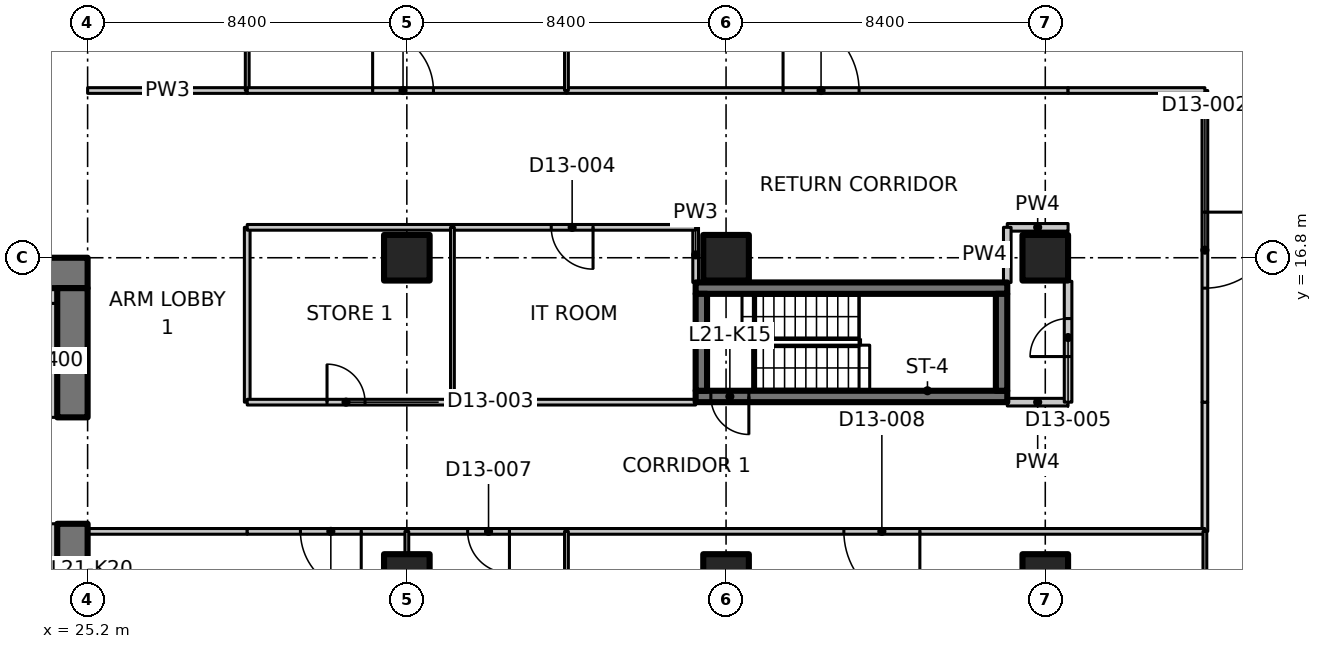
"""IFC4 building model, lengths in metres.
Left out: names, types, materials, properties, quantities, classifications, styles, units other than length and angle.
Written with IfcOpenShell. Run it as: python <this file> out.ifc"""

import sys

from ifc_helpers import new_model, si_unit, direction, frame, frame_2d, origin, origin_2d, place, context, subcontext, project, spatial, polyline, rectangle, outline, extrude, element, fill, save


model = new_model("IFC4")
c1 = context("Model", 3, precision=1e-05, world=origin(), true_north=direction((0.0, 1.0)))
c2 = subcontext(c1, "Body", "Model", "MODEL_VIEW")
j1 = project(units=[si_unit("LENGTHUNIT", "METRE"), si_unit("PLANEANGLEUNIT", "RADIAN")], contexts=[c1])
p1 = place(None, origin())
s1 = spatial("IfcSite", under=j1, at=p1, CompositionType="ELEMENT")
p2 = place(p1, origin())
s2 = spatial("IfcBuilding", under=s1, at=p2, CompositionType="ELEMENT")
p3 = place(p2, frame((0.0, 0.0, 91.7)))
s3 = spatial("IfcBuildingStorey", under=s2, at=p3, CompositionType="ELEMENT", Elevation=91.7)
for number, where, z_axis, x_axis in (
    (1, (33.6, 8.4, 0.0), (0.0, 0.0, 1.0), (1.0, 0.0, 0.0)),
    (2, (33.6, 16.8, 0.0), (0.0, 0.0, 1.0), (1.0, 0.0, 0.0)),
    (3, (42.0, 8.4, 0.0), (0.0, 0.0, 1.0), (1.0, 0.0, 0.0)),
    (4, (42.0, 16.8, 0.0), (0.0, 0.0, 1.0), (1.0, 0.0, 0.0)),
    (5, (50.4, 8.4, 0.0), (0.0, 0.0, 1.0), (1.0, 0.0, 0.0)),
    (6, (50.4, 16.8, 0.0), (0.0, 0.0, 1.0), (1.0, 0.0, 0.0)),
):
    element("IfcColumn", number, at=place(p3, frame(where, z_axis=z_axis, x_axis=x_axis)), inside=s3, PredefinedType="COLUMN", context=c2, shape_type="SweptSolid", body=[
        extrude(rectangle(XDim=1.2, YDim=1.2, at=origin_2d()), origin(), (0.0, 0.0, 1.0), 3.35),
    ])
p4 = place(p3, frame((23.8, 16.4, 0.0), z_axis=(0.0, 0.0, 1.0), x_axis=(1.0, 0.0, 0.0)))
e7 = element("IfcWall", 7, at=p4, inside=s3, PredefinedType="SHEAR", context=c2, shape_type="SweptSolid", body=[
    extrude(rectangle(XDim=1.4, YDim=0.8, at=frame_2d((0.7, 0.0))), origin(), (0.0, 0.0, 1.0), 3.35),
])
p5 = place(p3, frame((24.8, 0.8, 0.0), z_axis=(0.0, 0.0, 1.0), x_axis=(0.0, 1.0, 0.0)))
e8 = element("IfcWall", 8, at=p5, inside=s3, PredefinedType="SHEAR", context=c2, shape_type="SweptSolid", body=[
    extrude(rectangle(XDim=9.0, YDim=0.8, at=frame_2d((4.5, 0.0))), origin(), (0.0, 0.0, 1.0), 3.35),
])
p6 = place(p3, frame((24.8, 12.6, 0.0), z_axis=(0.0, 0.0, 1.0), x_axis=(0.0, 1.0, 0.0)))
e9 = element("IfcWall", 9, at=p6, inside=s3, PredefinedType="SHEAR", context=c2, shape_type="SweptSolid", body=[
    extrude(rectangle(XDim=3.4, YDim=0.8, at=frame_2d((1.7, 0.0))), origin(), (0.0, 0.0, 1.0), 3.35),
])
p7 = place(p3, frame((24.2, 12.6, 0.0), z_axis=(0.0, 0.0, 1.0), x_axis=(0.0, 1.0, 0.0)))
e10 = element("IfcWall", 10, at=p7, inside=s3, PredefinedType="PARTITIONING", context=c2, shape_type="SweptSolid", body=[
    extrude(rectangle(XDim=3.0, YDim=0.4, at=frame_2d((1.5, 0.0))), origin(), (0.0, 0.0, 1.0), 3.35),
])
p8 = place(p3, frame((23.8, 15.8, 0.0), z_axis=(0.0, 0.0, 1.0), x_axis=(1.0, 0.0, 0.0)))
e11 = element("IfcWall", 11, at=p8, inside=s3, PredefinedType="PARTITIONING", context=c2, shape_type="SweptSolid", body=[
    extrude(rectangle(XDim=0.6, YDim=0.4, at=frame_2d((0.3, 0.0))), origin(), (0.0, 0.0, 1.0), 3.35),
])
p9 = place(p3, frame((49.4, 13.15, 0.0), z_axis=(0.0, 0.0, 1.0), x_axis=(-1.0, 0.0, 0.0)))
e12 = element("IfcWall", 12, at=p9, inside=s3, PredefinedType="SHEAR", context=c2, shape_type="SweptSolid", body=[
    extrude(rectangle(XDim=8.2, YDim=0.3, at=frame_2d((4.1, 0.0))), origin(), (0.0, 0.0, 1.0), 3.35),
])
p10 = place(p9, frame((6.8, 0.0, 0.0)))
e13 = element("IfcOpeningElement", 13, at=p10, cuts=e12, PredefinedType="OPENING", context=c2, shape_type="SweptSolid", body=[
    extrude(rectangle(XDim=1.0, YDim=2.1, at=frame_2d((0.5, 1.05))), frame((0.0, 0.16, 0.0), z_axis=(0.0, -1.0, 0.0), x_axis=(1.0, 0.0, 0.0)), (0.0, 0.0, 1.0), 0.32),
])
p11 = place(p3, frame((41.2, 16.0, 0.0), z_axis=(0.0, 0.0, 1.0), x_axis=(1.0, 0.0, 0.0)))
e14 = element("IfcWall", 14, at=p11, inside=s3, PredefinedType="SHEAR", context=c2, shape_type="SweptSolid", body=[
    extrude(rectangle(XDim=8.2, YDim=0.3, at=frame_2d((4.1, 0.0))), origin(), (0.0, 0.0, 1.0), 3.35),
])
for number, where, z_axis, x_axis in (
    (15, (41.35, 13.3, 0.0), (0.0, 0.0, 1.0), (0.0, 1.0, 0.0)),
    (16, (49.25, 13.3, 0.0), (0.0, 0.0, 1.0), (0.0, 1.0, 0.0)),
):
    element("IfcWall", number, at=place(p3, frame(where, z_axis=z_axis, x_axis=x_axis)), inside=s3, PredefinedType="SHEAR", context=c2, shape_type="SweptSolid", body=[
        extrude(rectangle(XDim=2.55, YDim=0.3, at=frame_2d((1.275, 0.0))), origin(), (0.0, 0.0, 1.0), 3.35),
    ])
p12 = place(p3, frame((24.2, 4.35, 0.0), z_axis=(0.0, 0.0, 1.0), x_axis=(0.0, 1.0, 0.0)))
e17 = element("IfcWall", 17, at=p12, inside=s3, PredefinedType="PARTITIONING", context=c2, shape_type="SweptSolid", body=[
    extrude(rectangle(XDim=5.45, YDim=0.4, at=frame_2d((2.725, 0.0))), origin(), (0.0, 0.0, 1.0), 3.35),
])
p13 = place(p3, frame((25.2, 21.2, 0.0), z_axis=(0.0, 0.0, 1.0), x_axis=(1.0, 0.0, 0.0)))
e18 = element("IfcWall", 18, at=p13, inside=s3, PredefinedType="PARTITIONING", context=c2, shape_type="SweptSolid", body=[
    extrude(rectangle(XDim=4.2, YDim=0.15, at=frame_2d((2.1, 0.0))), origin(), (0.0, 0.0, 1.0), 3.33),
])
p14 = place(p3, frame((29.4, 17.6, 0.0), z_axis=(0.0, 0.0, 1.0), x_axis=(0.0, -1.0, 0.0)))
e19 = element("IfcWall", 19, at=p14, inside=s3, PredefinedType="PARTITIONING", context=c2, shape_type="SweptSolid", body=[
    extrude(rectangle(XDim=4.6, YDim=0.15, at=frame_2d((2.3, 0.0))), origin(), (0.0, 0.0, 1.0), 3.33),
])
p15 = place(p3, frame((29.4, 9.6, 0.0), z_axis=(0.0, 0.0, 1.0), x_axis=(-1.0, 0.0, 0.0)))
e20 = element("IfcWall", 20, at=p15, inside=s3, PredefinedType="PARTITIONING", context=c2, shape_type="SweptSolid", body=[
    extrude(rectangle(XDim=4.2, YDim=0.15, at=frame_2d((2.1, 0.0))), origin(), (0.0, 0.0, 1.0), 3.33),
])
p16 = place(p3, frame((29.4, 27.511, 0.0), z_axis=(0.0, 0.0, 1.0), x_axis=(0.0, -1.0, 0.0)))
e21 = element("IfcWall", 21, at=p16, inside=s3, PredefinedType="PARTITIONING", context=c2, shape_type="SweptSolid", body=[
    extrude(outline(polyline([(0.0, 0.0), (6.311, 0.0), (6.311, 3.33), (2.761, 3.33), (2.759, 2.98), (1.863, 2.98), (1.861, 3.33), (0.236, 3.33), (0.0, 3.33), (0.0, 0.0)])), frame((0.0, 0.05, 0.0), z_axis=(0.0, -1.0, 0.0), x_axis=(1.0, 0.0, 0.0)), (0.0, 0.0, 1.0), 0.1),
])
p17 = place(p3, frame((54.6, 13.0, 0.0), z_axis=(0.0, 0.0, 1.0), x_axis=(0.0, -1.0, 0.0)))
e22 = element("IfcWall", 22, at=p17, inside=s3, PredefinedType="PARTITIONING", context=c2, shape_type="SweptSolid", body=[
    extrude(rectangle(XDim=3.4, YDim=0.15, at=frame_2d((1.7, 0.0))), origin(), (0.0, 0.0, 1.0), 3.33),
])
p18 = place(p3, frame((29.4, 13.0, 0.0), z_axis=(0.0, 0.0, 1.0), x_axis=(1.0, 0.0, 0.0)))
e23 = element("IfcWall", 23, at=p18, inside=s3, PredefinedType="PARTITIONING", context=c2, shape_type="SweptSolid", body=[
    extrude(rectangle(XDim=5.4, YDim=0.15, at=frame_2d((2.7, 0.0))), origin(), (0.0, 0.0, 1.0), 3.33),
])
p19 = place(p18, frame((2.1, 0.0, 0.0)))
e24 = element("IfcOpeningElement", 24, at=p19, cuts=e23, PredefinedType="OPENING", context=c2, shape_type="SweptSolid", body=[
    extrude(rectangle(XDim=1.0, YDim=2.1, at=frame_2d((0.5, 1.05))), frame((0.0, 0.085, 0.0), z_axis=(0.0, -1.0, 0.0), x_axis=(1.0, 0.0, 0.0)), (0.0, 0.0, 1.0), 0.17),
])
p20 = place(p3, frame((34.8, 13.0, 0.0), z_axis=(0.0, 0.0, 1.0), x_axis=(1.0, 0.0, 0.0)))
e25 = element("IfcWall", 25, at=p20, inside=s3, PredefinedType="PARTITIONING", context=c2, shape_type="SweptSolid", body=[
    extrude(rectangle(XDim=6.4, YDim=0.15, at=frame_2d((3.2, 0.0))), origin(), (0.0, 0.0, 1.0), 3.33),
])
p21 = place(p3, frame((49.4, 13.0, 0.0), z_axis=(0.0, 0.0, 1.0), x_axis=(1.0, 0.0, 0.0)))
e26 = element("IfcWall", 26, at=p21, inside=s3, PredefinedType="PARTITIONING", context=c2, shape_type="SweptSolid", body=[
    extrude(rectangle(XDim=1.6, YDim=0.2, at=frame_2d((0.8, 0.0))), origin(), (0.0, 0.0, 1.0), 3.33),
])
p22 = place(p3, frame((33.6, 9.6, 0.0), z_axis=(0.0, 0.0, 1.0), x_axis=(-1.0, 0.0, 0.0)))
e27 = element("IfcWall", 27, at=p22, inside=s3, PredefinedType="PARTITIONING", context=c2, shape_type="SweptSolid", body=[
    extrude(rectangle(XDim=4.2, YDim=0.15, at=frame_2d((2.1, 0.0))), origin(), (0.0, 0.0, 1.0), 3.33),
])
p23 = place(p22, frame((1.2, 0.0, 0.0)))
e28 = element("IfcOpeningElement", 28, at=p23, cuts=e27, PredefinedType="OPENING", context=c2, shape_type="SweptSolid", body=[
    extrude(rectangle(XDim=1.6, YDim=2.1, at=frame_2d((0.8, 1.05))), frame((0.0, 0.085, 0.0), z_axis=(0.0, -1.0, 0.0), x_axis=(1.0, 0.0, 0.0)), (0.0, 0.0, 1.0), 0.17),
])
p24 = place(p3, frame((37.8, 9.6, 0.0), z_axis=(0.0, 0.0, 1.0), x_axis=(-1.0, 0.0, 0.0)))
e29 = element("IfcWall", 29, at=p24, inside=s3, PredefinedType="PARTITIONING", context=c2, shape_type="SweptSolid", body=[
    extrude(rectangle(XDim=4.2, YDim=0.15, at=frame_2d((2.1, 0.0))), origin(), (0.0, 0.0, 1.0), 3.33),
])
p25 = place(p24, frame((1.5, 0.0, 0.0)))
e30 = element("IfcOpeningElement", 30, at=p25, cuts=e29, PredefinedType="OPENING", context=c2, shape_type="SweptSolid", body=[
    extrude(rectangle(XDim=1.1, YDim=2.1, at=frame_2d((0.55, 1.05))), frame((0.0, 0.085, 0.0), z_axis=(0.0, -1.0, 0.0), x_axis=(1.0, 0.0, 0.0)), (0.0, 0.0, 1.0), 0.17),
])
p26 = place(p3, frame((54.6, 9.6, 0.0), z_axis=(0.0, 0.0, 1.0), x_axis=(-1.0, 0.0, 0.0)))
e31 = element("IfcWall", 31, at=p26, inside=s3, PredefinedType="PARTITIONING", context=c2, shape_type="SweptSolid", body=[
    extrude(rectangle(XDim=16.8, YDim=0.15, at=frame_2d((8.4, 0.0))), origin(), (0.0, 0.0, 1.0), 3.33),
])
p27 = place(p26, frame((7.5, 0.0, 0.0)))
e32 = element("IfcOpeningElement", 32, at=p27, cuts=e31, PredefinedType="OPENING", context=c2, shape_type="SweptSolid", body=[
    extrude(rectangle(XDim=2.0, YDim=2.4, at=frame_2d((1.0, 1.2))), frame((0.0, 0.085, 0.0), z_axis=(0.0, -1.0, 0.0), x_axis=(1.0, 0.0, 0.0)), (0.0, 0.0, 1.0), 0.17),
])
p28 = place(p3, frame((54.6, 21.2, 0.0), z_axis=(0.0, 0.0, 1.0), x_axis=(0.0, -1.0, 0.0)))
e33 = element("IfcWall", 33, at=p28, inside=s3, PredefinedType="PARTITIONING", context=c2, shape_type="SweptSolid", body=[
    extrude(rectangle(XDim=8.2, YDim=0.15, at=frame_2d((4.1, 0.0))), origin(), (0.0, 0.0, 1.0), 3.33),
])
p29 = place(p28, frame((3.2, 0.0, 0.0)))
e34 = element("IfcOpeningElement", 34, at=p29, cuts=e33, PredefinedType="OPENING", context=c2, shape_type="SweptSolid", body=[
    extrude(rectangle(XDim=2.0, YDim=2.4, at=frame_2d((1.0, 1.2))), frame((0.0, 0.085, 0.0), z_axis=(0.0, -1.0, 0.0), x_axis=(1.0, 0.0, 0.0)), (0.0, 0.0, 1.0), 0.17),
])
p30 = place(p3, frame((54.6, -1.174, 0.0), z_axis=(0.0, 0.0, 1.0), x_axis=(0.0, 1.0, 0.0)))
e35 = element("IfcWall", 35, at=p30, inside=s3, PredefinedType="PARTITIONING", context=c2, shape_type="SweptSolid", body=[
    extrude(outline(polyline([(0.0, 0.0), (10.774, 0.0), (10.774, 3.33), (1.624, 3.33), (1.622, 2.98), (0.726, 2.98), (0.724, 3.33), (0.074, 3.33), (0.0, 3.33), (0.0, 0.0)])), frame((0.0, 0.05, 0.0), z_axis=(0.0, -1.0, 0.0), x_axis=(1.0, 0.0, 0.0)), (0.0, 0.0, 1.0), 0.1),
])
p31 = place(p3, frame((34.8, 17.6, 0.0), z_axis=(0.0, 0.0, 1.0), x_axis=(-1.0, 0.0, 0.0)))
e36 = element("IfcWall", 36, at=p31, inside=s3, PredefinedType="PARTITIONING", context=c2, shape_type="SweptSolid", body=[
    extrude(rectangle(XDim=5.4, YDim=0.15, at=frame_2d((2.7, 0.0))), origin(), (0.0, 0.0, 1.0), 3.33),
])
p32 = place(p3, frame((41.2, 16.15, 0.0), z_axis=(0.0, 0.0, 1.0), x_axis=(0.0, 1.0, 0.0)))
e37 = element("IfcWall", 37, at=p32, inside=s3, PredefinedType="PARTITIONING", context=c2, shape_type="SweptSolid", body=[
    extrude(rectangle(XDim=1.45, YDim=0.15, at=frame_2d((0.725, 0.0))), origin(), (0.0, 0.0, 1.0), 3.33),
])
p33 = place(p3, frame((41.2, 17.6, 0.0), z_axis=(0.0, 0.0, 1.0), x_axis=(-1.0, 0.0, 0.0)))
e38 = element("IfcWall", 38, at=p33, inside=s3, PredefinedType="PARTITIONING", context=c2, shape_type="SweptSolid", body=[
    extrude(rectangle(XDim=6.4, YDim=0.15, at=frame_2d((3.2, 0.0))), origin(), (0.0, 0.0, 1.0), 3.33),
])
p34 = place(p33, frame((2.7, 0.0, 0.0)))
e39 = element("IfcOpeningElement", 39, at=p34, cuts=e38, PredefinedType="OPENING", context=c2, shape_type="SweptSolid", body=[
    extrude(rectangle(XDim=1.1, YDim=2.1, at=frame_2d((0.55, 1.05))), frame((0.0, 0.085, 0.0), z_axis=(0.0, -1.0, 0.0), x_axis=(1.0, 0.0, 0.0)), (0.0, 0.0, 1.0), 0.17),
])
p35 = place(p3, frame((51.0, 17.6, 0.0), z_axis=(0.0, 0.0, 1.0), x_axis=(-1.0, 0.0, 0.0)))
e40 = element("IfcWall", 40, at=p35, inside=s3, PredefinedType="PARTITIONING", context=c2, shape_type="SweptSolid", body=[
    extrude(rectangle(XDim=1.6, YDim=0.2, at=frame_2d((0.8, 0.0))), origin(), (0.0, 0.0, 1.0), 3.33),
])
p36 = place(p3, frame((49.4, 17.6, 0.0), z_axis=(0.0, 0.0, 1.0), x_axis=(0.0, -1.0, 0.0)))
e41 = element("IfcWall", 41, at=p36, inside=s3, PredefinedType="PARTITIONING", context=c2, shape_type="SweptSolid", body=[
    extrude(rectangle(XDim=1.45, YDim=0.2, at=frame_2d((0.725, 0.0))), origin(), (0.0, 0.0, 1.0), 3.33),
])
p37 = place(p3, frame((29.4, 21.2, 0.0), z_axis=(0.0, 0.0, 1.0), x_axis=(1.0, 0.0, 0.0)))
e42 = element("IfcWall", 42, at=p37, inside=s3, PredefinedType="PARTITIONING", context=c2, shape_type="SweptSolid", body=[
    extrude(rectangle(XDim=8.4, YDim=0.15, at=frame_2d((4.2, 0.0))), origin(), (0.0, 0.0, 1.0), 3.33),
])
p38 = place(p37, frame((3.3, 0.0, 0.0)))
e43 = element("IfcOpeningElement", 43, at=p38, cuts=e42, PredefinedType="OPENING", context=c2, shape_type="SweptSolid", body=[
    extrude(rectangle(XDim=1.6, YDim=2.1, at=frame_2d((0.8, 1.05))), frame((0.0, 0.085, 0.0), z_axis=(0.0, -1.0, 0.0), x_axis=(1.0, 0.0, 0.0)), (0.0, 0.0, 1.0), 0.17),
])
p39 = place(p3, frame((37.8, 21.2, 0.0), z_axis=(0.0, 0.0, 1.0), x_axis=(1.0, 0.0, 0.0)))
e44 = element("IfcWall", 44, at=p39, inside=s3, PredefinedType="PARTITIONING", context=c2, shape_type="SweptSolid", body=[
    extrude(rectangle(XDim=13.2, YDim=0.15, at=frame_2d((6.6, 0.0))), origin(), (0.0, 0.0, 1.0), 3.33),
])
p40 = place(p39, frame((5.7, 0.0, 0.0)))
e45 = element("IfcOpeningElement", 45, at=p40, cuts=e44, PredefinedType="OPENING", context=c2, shape_type="SweptSolid", body=[
    extrude(rectangle(XDim=2.0, YDim=2.4, at=frame_2d((1.0, 1.2))), frame((0.0, 0.085, 0.0), z_axis=(0.0, -1.0, 0.0), x_axis=(1.0, 0.0, 0.0)), (0.0, 0.0, 1.0), 0.17),
])
p41 = place(p3, frame((51.0, 13.0, 0.0), z_axis=(0.0, 0.0, 1.0), x_axis=(0.0, 1.0, 0.0)))
e46 = element("IfcWall", 46, at=p41, inside=s3, PredefinedType="PARTITIONING", context=c2, shape_type="SweptSolid", body=[
    extrude(rectangle(XDim=3.18, YDim=0.2, at=frame_2d((1.59, 0.0))), origin(), (0.0, 0.0, 1.0), 3.33),
])
p42 = place(p41, frame((1.2, 0.0, 0.0)))
e47 = element("IfcOpeningElement", 47, at=p42, cuts=e46, PredefinedType="OPENING", context=c2, shape_type="SweptSolid", body=[
    extrude(rectangle(XDim=1.0, YDim=2.1, at=frame_2d((0.5, 1.05))), frame((0.0, 0.11, 0.0), z_axis=(0.0, -1.0, 0.0), x_axis=(1.0, 0.0, 0.0)), (0.0, 0.0, 1.0), 0.22),
])
p43 = place(p3, frame((51.0, 21.2, 0.0), z_axis=(0.0, 0.0, 1.0), x_axis=(1.0, 0.0, 0.0)))
e48 = element("IfcWall", 48, at=p43, inside=s3, PredefinedType="PARTITIONING", context=c2, shape_type="SweptSolid", body=[
    extrude(rectangle(XDim=3.6, YDim=0.15, at=frame_2d((1.8, 0.0))), origin(), (0.0, 0.0, 1.0), 3.33),
])
p44 = place(p3, frame((34.8, 17.6, 0.0), z_axis=(0.0, 0.0, 1.0), x_axis=(0.0, -1.0, 0.0)))
e49 = element("IfcWall", 49, at=p44, inside=s3, PredefinedType="PARTITIONING", context=c2, shape_type="SweptSolid", body=[
    extrude(rectangle(XDim=4.6, YDim=0.1, at=frame_2d((2.3, 0.0))), origin(), (0.0, 0.0, 1.0), 3.33),
])
p45 = place(p3, frame((33.6, 9.6, 0.0), z_axis=(0.0, 0.0, 1.0), x_axis=(0.0, -1.0, 0.0)))
e50 = element("IfcWall", 50, at=p45, inside=s3, PredefinedType="PARTITIONING", context=c2, shape_type="SweptSolid", body=[
    extrude(rectangle(XDim=0.58, YDim=0.1, at=frame_2d((0.29, 0.0))), origin(), (0.0, 0.0, 1.0), 3.33),
])
p46 = place(p3, frame((37.8, 9.6, 0.0), z_axis=(0.0, 0.0, 1.0), x_axis=(0.0, -1.0, 0.0)))
e51 = element("IfcWall", 51, at=p46, inside=s3, PredefinedType="PARTITIONING", context=c2, shape_type="SweptSolid", body=[
    extrude(outline(polyline([(0.0, 0.0), (10.774, 0.0), (10.774, 3.33), (10.7, 3.33), (10.05, 3.33), (10.048, 2.98), (9.152, 2.98), (9.15, 3.33), (0.0, 3.33), (0.0, 0.0)])), frame((0.0, 0.05, 0.0), z_axis=(0.0, -1.0, 0.0), x_axis=(1.0, 0.0, 0.0)), (0.0, 0.0, 1.0), 0.1),
])
p47 = place(p3, frame((37.8, 30.526, 0.0), z_axis=(0.0, 0.0, 1.0), x_axis=(0.0, -1.0, 0.0)))
e52 = element("IfcWall", 52, at=p47, inside=s3, PredefinedType="PARTITIONING", context=c2, shape_type="SweptSolid", body=[
    extrude(outline(polyline([(0.0, 0.0), (9.326, 0.0), (9.326, 3.33), (5.776, 3.33), (5.774, 2.98), (4.878, 2.98), (4.876, 3.33), (0.283, 3.33), (0.0, 3.33), (0.0, 0.0)])), frame((0.0, 0.05, 0.0), z_axis=(0.0, -1.0, 0.0), x_axis=(1.0, 0.0, 0.0)), (0.0, 0.0, 1.0), 0.1),
])
p48 = place(p10, origin())
e53 = element("IfcDoor", 53, at=p48, inside=s3, OperationType="SINGLE_SWING_LEFT", PredefinedType="DOOR", context=c2, shape_type="SweptSolid", body=[
    extrude(rectangle(XDim=1.0, YDim=2.1, at=frame_2d((0.5, 1.05))), frame((0.0, 0.025, 0.0), z_axis=(0.0, -1.0, 0.0), x_axis=(1.0, 0.0, 0.0)), (0.0, 0.0, 1.0), 0.05),
])
fill(e13, e53)
p49 = place(p29, origin())
e54 = element("IfcDoor", 54, at=p49, inside=s3, OperationType="DOUBLE_DOOR_SINGLE_SWING", PredefinedType="DOOR", context=c2, shape_type="SweptSolid", body=[
    extrude(rectangle(XDim=2.0, YDim=2.4, at=frame_2d((1.0, 1.2))), frame((0.0, 0.025, 0.0), z_axis=(0.0, -1.0, 0.0), x_axis=(1.0, 0.0, 0.0)), (0.0, 0.0, 1.0), 0.05),
])
fill(e34, e54)
p50 = place(p19, origin())
e55 = element("IfcDoor", 55, at=p50, inside=s3, OperationType="SINGLE_SWING_LEFT", PredefinedType="DOOR", context=c2, shape_type="SweptSolid", body=[
    extrude(rectangle(XDim=1.0, YDim=2.1, at=frame_2d((0.5, 1.05))), frame((0.0, 0.025, 0.0), z_axis=(0.0, -1.0, 0.0), x_axis=(1.0, 0.0, 0.0)), (0.0, 0.0, 1.0), 0.05),
])
fill(e24, e55)
p51 = place(p34, origin())
e56 = element("IfcDoor", 56, at=p51, inside=s3, OperationType="SINGLE_SWING_LEFT", PredefinedType="DOOR", context=c2, shape_type="SweptSolid", body=[
    extrude(rectangle(XDim=1.1, YDim=2.1, at=frame_2d((0.55, 1.05))), frame((0.0, 0.025, 0.0), z_axis=(0.0, -1.0, 0.0), x_axis=(1.0, 0.0, 0.0)), (0.0, 0.0, 1.0), 0.05),
])
fill(e39, e56)
p52 = place(p42, origin())
e57 = element("IfcDoor", 57, at=p52, inside=s3, OperationType="SINGLE_SWING_LEFT", PredefinedType="DOOR", context=c2, shape_type="SweptSolid", body=[
    extrude(rectangle(XDim=1.0, YDim=2.1, at=frame_2d((0.5, 1.05))), frame((0.0, 0.025, 0.0), z_axis=(0.0, -1.0, 0.0), x_axis=(1.0, 0.0, 0.0)), (0.0, 0.0, 1.0), 0.05),
])
fill(e47, e57)
p53 = place(p23, origin())
e58 = element("IfcDoor", 58, at=p53, inside=s3, OperationType="DOUBLE_DOOR_SINGLE_SWING", PredefinedType="DOOR", context=c2, shape_type="SweptSolid", body=[
    extrude(rectangle(XDim=1.6, YDim=2.1, at=frame_2d((0.8, 1.05))), frame((0.0, 0.025, 0.0), z_axis=(0.0, -1.0, 0.0), x_axis=(1.0, 0.0, 0.0)), (0.0, 0.0, 1.0), 0.05),
])
fill(e28, e58)
p54 = place(p25, origin())
e59 = element("IfcDoor", 59, at=p54, inside=s3, OperationType="SINGLE_SWING_LEFT", PredefinedType="DOOR", context=c2, shape_type="SweptSolid", body=[
    extrude(rectangle(XDim=1.1, YDim=2.1, at=frame_2d((0.55, 1.05))), frame((0.0, 0.025, 0.0), z_axis=(0.0, -1.0, 0.0), x_axis=(1.0, 0.0, 0.0)), (0.0, 0.0, 1.0), 0.05),
])
fill(e30, e59)
p55 = place(p27, origin())
e60 = element("IfcDoor", 60, at=p55, inside=s3, OperationType="DOUBLE_DOOR_SINGLE_SWING", PredefinedType="DOOR", context=c2, shape_type="SweptSolid", body=[
    extrude(rectangle(XDim=2.0, YDim=2.4, at=frame_2d((1.0, 1.2))), frame((0.0, 0.025, 0.0), z_axis=(0.0, -1.0, 0.0), x_axis=(1.0, 0.0, 0.0)), (0.0, 0.0, 1.0), 0.05),
])
fill(e32, e60)
p56 = place(p38, origin())
e61 = element("IfcDoor", 61, at=p56, inside=s3, OperationType="DOUBLE_DOOR_SINGLE_SWING", PredefinedType="DOOR", context=c2, shape_type="SweptSolid", body=[
    extrude(rectangle(XDim=1.6, YDim=2.1, at=frame_2d((0.8, 1.05))), frame((0.0, 0.025, 0.0), z_axis=(0.0, -1.0, 0.0), x_axis=(1.0, 0.0, 0.0)), (0.0, 0.0, 1.0), 0.05),
])
fill(e43, e61)
p57 = place(p40, origin())
e62 = element("IfcDoor", 62, at=p57, inside=s3, OperationType="DOUBLE_DOOR_SINGLE_SWING", PredefinedType="DOOR", context=c2, shape_type="SweptSolid", body=[
    extrude(rectangle(XDim=2.0, YDim=2.4, at=frame_2d((1.0, 1.2))), frame((0.0, 0.025, 0.0), z_axis=(0.0, -1.0, 0.0), x_axis=(1.0, 0.0, 0.0)), (0.0, 0.0, 1.0), 0.05),
])
fill(e45, e62)
save(model, sys.argv[1])
